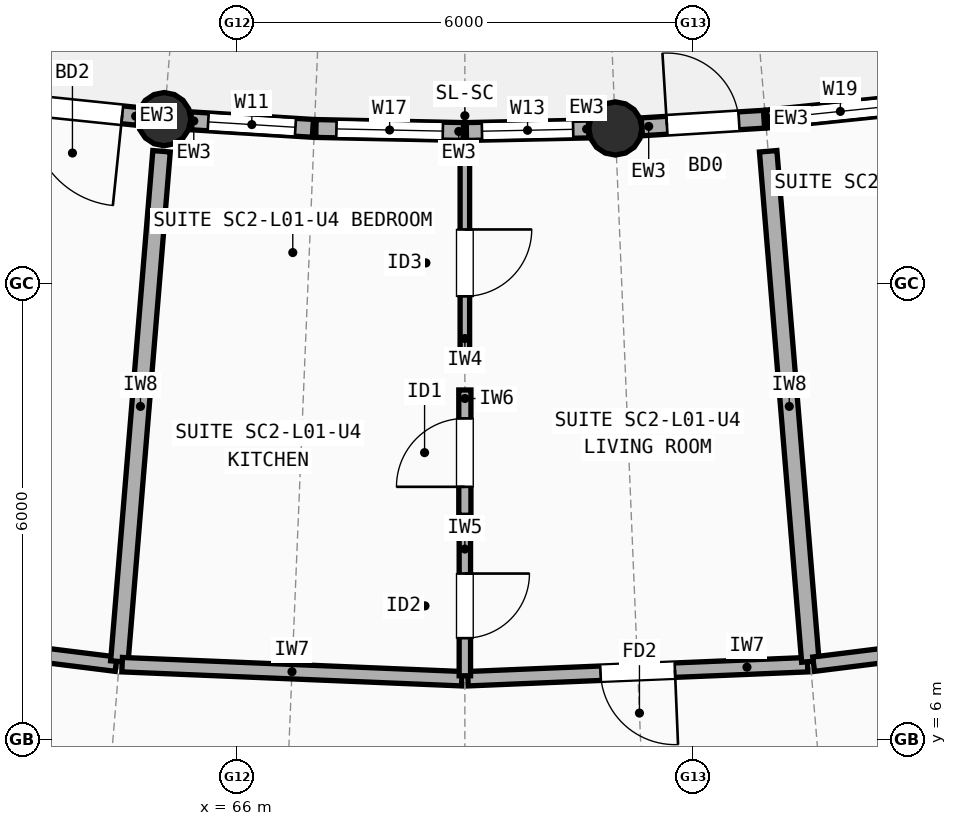
"""IFC4 building model, lengths in metres.
Left out: names, types, materials, properties, quantities, classifications, styles, units other than length and angle.
Written with IfcOpenShell. Run it as: python <this file> out.ifc"""

import sys

from ifc_helpers import new_model, si_unit, direction, frame, frame_2d, origin, origin_2d, place, context, subcontext, project, spatial, rectangle, circle, extrude, element, fill, save


model = new_model("IFC4")
c1 = context("Model", 3, precision=1e-05, world=origin(), true_north=direction((0.0, 1.0)))
c2 = subcontext(c1, "Body", "Model", "MODEL_VIEW")
j1 = project(units=[si_unit("LENGTHUNIT", "METRE"), si_unit("PLANEANGLEUNIT", "RADIAN")], contexts=[c1])
p1 = place(None, origin())
s1 = spatial("IfcSite", under=j1, at=p1, CompositionType="ELEMENT")
p2 = place(p1, origin())
s2 = spatial("IfcBuilding", under=s1, at=p2, CompositionType="ELEMENT")
p3 = place(p2, frame((0.0, 0.0, 4.5)))
s3 = spatial("IfcBuildingStorey", under=s2, at=p3, CompositionType="ELEMENT", Elevation=4.5)
for number, where, z_axis, x_axis in (
    (1, (65.044, 14.163, 0.0), (0.0, 0.0, 1.0), (1.0, 0.0, 0.0)),
    (2, (70.979, 14.041, 0.0), (0.0, 0.0, 1.0), (1.0, 0.0, 0.0)),
):
    element("IfcColumn", number, at=place(p3, frame(where, z_axis=z_axis, x_axis=x_axis)), inside=s3, PredefinedType="COLUMN", context=c2, shape_type="SweptSolid", body=[
        extrude(circle(Radius=0.35, at=origin_2d()), origin(), (0.0, 0.0, 1.0), 2.948),
    ])
p4 = place(p3, frame((63.094, 14.365, 0.0), z_axis=(0.0, 0.0, 1.0), x_axis=(0.994685905428, -0.10295605637, 0.0)))
e3 = element("IfcWall", 3, at=p4, inside=s3, PredefinedType="STANDARD", context=c2, shape_type="SweptSolid", body=[
    extrude(rectangle(XDim=1.61, YDim=0.235, at=frame_2d((0.805, 0.0))), origin(), (0.0, 0.0, 1.0), 2.684),
])
p5 = place(p4, frame((0.205, 0.0, 0.0)))
e4 = element("IfcOpeningElement", 4, at=p5, cuts=e3, PredefinedType="OPENING", context=c2, shape_type="SweptSolid", body=[
    extrude(rectangle(XDim=1.2, YDim=2.15, at=frame_2d((0.6, 1.075))), frame((0.0, 0.127, 0.0), z_axis=(0.0, -1.0, 0.0), x_axis=(1.0, 0.0, 0.0)), (0.0, 0.0, 1.0), 0.255),
])
p6 = place(p3, frame((65.394, 14.142, 0.0), z_axis=(0.0, 0.0, 1.0), x_axis=(0.998084310064, -0.061868489594, 0.0)))
e5 = element("IfcWall", 5, at=p6, inside=s3, PredefinedType="STANDARD", context=c2, shape_type="SweptSolid", body=[
    extrude(rectangle(XDim=1.61, YDim=0.235, at=frame_2d((0.805, 0.0))), origin(), (0.0, 0.0, 1.0), 2.684),
])
p7 = place(p6, frame((0.23, 0.0, 0.85)))
e6 = element("IfcOpeningElement", 6, at=p7, cuts=e5, PredefinedType="OPENING", context=c2, shape_type="SweptSolid", body=[
    extrude(rectangle(XDim=1.15, YDim=1.45, at=frame_2d((0.575, 0.725))), frame((0.0, 0.127, 0.0), z_axis=(0.0, -1.0, 0.0), x_axis=(1.0, 0.0, 0.0)), (0.0, 0.0, 1.0), 0.255),
])
p8 = place(p3, frame((67.04, 14.04, 0.0), z_axis=(0.0, 0.0, 1.0), x_axis=(0.999789612304, -0.020511731505, 0.0)))
e7 = element("IfcWall", 7, at=p8, inside=s3, PredefinedType="STANDARD", context=c2, shape_type="SweptSolid", body=[
    extrude(rectangle(XDim=1.94, YDim=0.235, at=frame_2d((0.97, 0.0))), origin(), (0.0, 0.0, 1.0), 2.684),
])
p9 = place(p8, frame((0.27, 0.0, 0.85)))
e8 = element("IfcOpeningElement", 8, at=p9, cuts=e7, PredefinedType="OPENING", context=c2, shape_type="SweptSolid", body=[
    extrude(rectangle(XDim=1.4, YDim=1.5, at=frame_2d((0.7, 0.75))), frame((0.0, 0.127, 0.0), z_axis=(0.0, -1.0, 0.0), x_axis=(1.0, 0.0, 0.0)), (0.0, 0.0, 1.0), 0.255),
])
p10 = place(p3, frame((69.02, 14.0, 0.0), z_axis=(0.0, 0.0, 1.0), x_axis=(0.999787311946, 0.020623551407, 0.0)))
e9 = element("IfcWall", 9, at=p10, inside=s3, PredefinedType="STANDARD", context=c2, shape_type="SweptSolid", body=[
    extrude(rectangle(XDim=1.61, YDim=0.235, at=frame_2d((0.805, 0.0))), origin(), (0.0, 0.0, 1.0), 2.684),
])
p11 = place(p10, frame((0.205, 0.0, 0.85)))
e10 = element("IfcOpeningElement", 10, at=p11, cuts=e9, PredefinedType="OPENING", context=c2, shape_type="SweptSolid", body=[
    extrude(rectangle(XDim=1.2, YDim=1.45, at=frame_2d((0.6, 0.725))), frame((0.0, 0.127, 0.0), z_axis=(0.0, -1.0, 0.0), x_axis=(1.0, 0.0, 0.0)), (0.0, 0.0, 1.0), 0.255),
])
p12 = place(p3, frame((71.329, 14.062, 0.0), z_axis=(0.0, 0.0, 1.0), x_axis=(0.998084310064, 0.061868489594, 0.0)))
e11 = element("IfcWall", 11, at=p12, inside=s3, PredefinedType="STANDARD", context=c2, shape_type="SweptSolid", body=[
    extrude(rectangle(XDim=1.61, YDim=0.235, at=frame_2d((0.805, 0.0))), origin(), (0.0, 0.0, 1.0), 2.684),
])
p13 = place(p12, frame((0.33, 0.0, 0.0)))
e12 = element("IfcOpeningElement", 12, at=p13, cuts=e11, PredefinedType="OPENING", context=c2, shape_type="SweptSolid", body=[
    extrude(rectangle(XDim=0.95, YDim=2.12, at=frame_2d((0.475, 1.06))), frame((0.0, 0.127, 0.0), z_axis=(0.0, -1.0, 0.0), x_axis=(1.0, 0.0, 0.0)), (0.0, 0.0, 1.0), 0.255),
])
p14 = place(p3, frame((72.976, 14.165, 0.0), z_axis=(0.0, 0.0, 1.0), x_axis=(0.994688684624, 0.10292920228, 0.0)))
e13 = element("IfcWall", 13, at=p14, inside=s3, PredefinedType="STANDARD", context=c2, shape_type="SweptSolid", body=[
    extrude(rectangle(XDim=1.94, YDim=0.235, at=frame_2d((0.97, 0.0))), origin(), (0.0, 0.0, 1.0), 2.684),
])
p15 = place(p14, frame((0.22, 0.0, 0.85)))
e14 = element("IfcOpeningElement", 14, at=p15, cuts=e13, PredefinedType="OPENING", context=c2, shape_type="SweptSolid", body=[
    extrude(rectangle(XDim=1.5, YDim=1.5, at=frame_2d((0.75, 0.75))), frame((0.0, 0.127, 0.0), z_axis=(0.0, -1.0, 0.0), x_axis=(1.0, 0.0, 0.0)), (0.0, 0.0, 1.0), 0.255),
])
p16 = place(p3, frame((59.972, 7.545, 0.0), z_axis=(0.0, 0.0, 1.0), x_axis=(0.992349920368, -0.123457019023, 0.0)))
e15 = element("IfcWall", 15, at=p16, inside=s3, PredefinedType="SOLIDWALL", context=c2, shape_type="SweptSolid", body=[
    extrude(rectangle(XDim=4.473, YDim=0.19, at=frame_2d((2.237, 0.0))), origin(), (0.0, 0.0, 1.0), 2.762),
])
p17 = place(p16, frame((1.737, 0.0, 0.0)))
e16 = element("IfcOpeningElement", 16, at=p17, cuts=e15, PredefinedType="OPENING", context=c2, shape_type="SweptSolid", body=[
    extrude(rectangle(XDim=1.0, YDim=2.15, at=frame_2d((0.5, 1.075))), frame((0.0, 0.105, 0.0), z_axis=(0.0, -1.0, 0.0), x_axis=(1.0, 0.0, 0.0)), (0.0, 0.0, 1.0), 0.21),
])
p18 = place(p3, frame((65.009, 13.741, 0.0), z_axis=(0.0, 0.0, 1.0), x_axis=(-0.082418569382, -0.996597802236, 0.0)))
e17 = element("IfcWall", 17, at=p18, inside=s3, PredefinedType="SOLIDWALL", context=c2, shape_type="SweptSolid", body=[
    extrude(rectangle(XDim=6.736, YDim=0.23, at=frame_2d((3.368, 0.0))), origin(), (0.0, 0.0, 1.0), 2.722),
])
p19 = place(p3, frame((64.491, 6.986, 0.0), z_axis=(0.0, 0.0, 1.0), x_axis=(0.999148329529, -0.041262762871, 0.0)))
e18 = element("IfcWall", 18, at=p19, inside=s3, PredefinedType="SOLIDWALL", context=c2, shape_type="SweptSolid", body=[
    extrude(rectangle(XDim=4.473, YDim=0.19, at=frame_2d((2.237, 0.0))), origin(), (0.0, 0.0, 1.0), 2.742),
])
p20 = place(p3, frame((69.04, 6.802, 0.0), z_axis=(0.0, 0.0, 1.0), x_axis=(0.999148329529, 0.041262762871, 0.0)))
e19 = element("IfcWall", 19, at=p20, inside=s3, PredefinedType="SOLIDWALL", context=c2, shape_type="SweptSolid", body=[
    extrude(rectangle(XDim=4.473, YDim=0.19, at=frame_2d((2.237, 0.0))), origin(), (0.0, 0.0, 1.0), 2.722),
])
p21 = place(p20, frame((1.747, 0.0, 0.0)))
e20 = element("IfcOpeningElement", 20, at=p21, cuts=e19, PredefinedType="OPENING", context=c2, shape_type="SweptSolid", body=[
    extrude(rectangle(XDim=0.98, YDim=2.15, at=frame_2d((0.49, 1.075))), frame((0.0, 0.105, 0.0), z_axis=(0.0, -1.0, 0.0), x_axis=(1.0, 0.0, 0.0)), (0.0, 0.0, 1.0), 0.21),
])
p22 = place(p3, frame((69.0, 13.672, 0.0), z_axis=(0.0, 0.0, 1.0), x_axis=(0.0, -1.0, 0.0)))
e21 = element("IfcWall", 21, at=p22, inside=s3, PredefinedType="PARTITIONING", context=c2, shape_type="SweptSolid", body=[
    extrude(rectangle(XDim=2.8, YDim=0.125, at=frame_2d((1.4, 0.0))), origin(), (0.0, 0.0, 1.0), 2.762),
])
p23 = place(p22, frame((0.96, 0.0, 0.0)))
e22 = element("IfcOpeningElement", 22, at=p23, cuts=e21, PredefinedType="OPENING", context=c2, shape_type="SweptSolid", body=[
    extrude(rectangle(XDim=0.88, YDim=2.1, at=frame_2d((0.44, 1.05))), frame((0.0, 0.073, 0.0), z_axis=(0.0, -1.0, 0.0), x_axis=(1.0, 0.0, 0.0)), (0.0, 0.0, 1.0), 0.145),
])
p24 = place(p3, frame((69.0, 10.6, 0.0), z_axis=(0.0, 0.0, 1.0), x_axis=(0.0, -1.0, 0.0)))
e23 = element("IfcWall", 23, at=p24, inside=s3, PredefinedType="PLUMBINGWALL", context=c2, shape_type="SweptSolid", body=[
    extrude(rectangle(XDim=1.648, YDim=0.16, at=frame_2d((0.824, 0.0))), origin(), (0.0, 0.0, 1.0), 2.762),
])
p25 = place(p24, frame((0.374, 0.0, 0.0)))
e24 = element("IfcOpeningElement", 24, at=p25, cuts=e23, PredefinedType="OPENING", context=c2, shape_type="SweptSolid", body=[
    extrude(rectangle(XDim=0.9, YDim=2.1, at=frame_2d((0.45, 1.05))), frame((0.0, 0.09, 0.0), z_axis=(0.0, -1.0, 0.0), x_axis=(1.0, 0.0, 0.0)), (0.0, 0.0, 1.0), 0.18),
])
p26 = place(p3, frame((69.0, 8.68, 0.0), z_axis=(0.0, 0.0, 1.0), x_axis=(0.0, -1.0, 0.0)))
e25 = element("IfcWall", 25, at=p26, inside=s3, PredefinedType="PARTITIONING", context=c2, shape_type="SweptSolid", body=[
    extrude(rectangle(XDim=1.84, YDim=0.15, at=frame_2d((0.92, 0.0))), origin(), (0.0, 0.0, 1.0), 2.762),
])
p27 = place(p26, frame((0.495, 0.0, 0.0)))
e26 = element("IfcOpeningElement", 26, at=p27, cuts=e25, PredefinedType="OPENING", context=c2, shape_type="SweptSolid", body=[
    extrude(rectangle(XDim=0.85, YDim=2.1, at=frame_2d((0.425, 1.05))), frame((0.0, 0.085, 0.0), z_axis=(0.0, -1.0, 0.0), x_axis=(1.0, 0.0, 0.0)), (0.0, 0.0, 1.0), 0.17),
])
p28 = place(p3, frame((72.991, 13.741, 0.0), z_axis=(0.0, 0.0, 1.0), x_axis=(0.082418569382, -0.996597802236, 0.0)))
e27 = element("IfcWall", 27, at=p28, inside=s3, PredefinedType="SOLIDWALL", context=c2, shape_type="SweptSolid", body=[
    extrude(rectangle(XDim=6.736, YDim=0.23, at=frame_2d((3.368, 0.0))), origin(), (0.0, 0.0, 1.0), 2.742),
])
p29 = place(p3, frame((73.589, 6.993, 0.0), z_axis=(0.0, 0.0, 1.0), x_axis=(0.992349088432, 0.123463705959, 0.0)))
e28 = element("IfcWall", 28, at=p29, inside=s3, PredefinedType="SOLIDWALL", context=c2, shape_type="SweptSolid", body=[
    extrude(rectangle(XDim=4.473, YDim=0.19, at=frame_2d((2.236, 0.0))), origin(), (0.0, 0.0, 1.0), 2.762),
])
p30 = place(p5, origin())
e29 = element("IfcDoor", 29, at=p30, inside=s3, OperationType="SINGLE_SWING_RIGHT", PredefinedType="DOOR", context=c2, shape_type="SweptSolid", body=[
    extrude(rectangle(XDim=1.2, YDim=2.15, at=frame_2d((0.6, 1.075))), frame((0.0, 0.025, 0.0), z_axis=(0.0, -1.0, 0.0), x_axis=(1.0, 0.0, 0.0)), (0.0, 0.0, 1.0), 0.05),
])
fill(e4, e29)
p31 = place(p7, origin())
e30 = element("IfcWindow", 30, at=p31, inside=s3, PartitioningType="SINGLE_PANEL", PredefinedType="WINDOW", context=c2, shape_type="SweptSolid", body=[
    extrude(rectangle(XDim=1.15, YDim=1.45, at=frame_2d((0.575, 0.725))), frame((0.0, 0.03, 0.0), z_axis=(0.0, -1.0, 0.0), x_axis=(1.0, 0.0, 0.0)), (0.0, 0.0, 1.0), 0.06),
])
fill(e6, e30)
p32 = place(p9, origin())
e31 = element("IfcWindow", 31, at=p32, inside=s3, PartitioningType="SINGLE_PANEL", PredefinedType="WINDOW", context=c2, shape_type="SweptSolid", body=[
    extrude(rectangle(XDim=1.4, YDim=1.5, at=frame_2d((0.7, 0.75))), frame((0.0, 0.03, 0.0), z_axis=(0.0, -1.0, 0.0), x_axis=(1.0, 0.0, 0.0)), (0.0, 0.0, 1.0), 0.06),
])
fill(e8, e31)
p33 = place(p11, origin())
e32 = element("IfcWindow", 32, at=p33, inside=s3, PartitioningType="SINGLE_PANEL", PredefinedType="WINDOW", context=c2, shape_type="SweptSolid", body=[
    extrude(rectangle(XDim=1.2, YDim=1.45, at=frame_2d((0.6, 0.725))), frame((0.0, 0.03, 0.0), z_axis=(0.0, -1.0, 0.0), x_axis=(1.0, 0.0, 0.0)), (0.0, 0.0, 1.0), 0.06),
])
fill(e10, e32)
p34 = place(p13, origin())
e33 = element("IfcDoor", 33, at=p34, inside=s3, OperationType="SINGLE_SWING_LEFT", PredefinedType="DOOR", context=c2, shape_type="SweptSolid", body=[
    extrude(rectangle(XDim=0.95, YDim=2.12, at=frame_2d((0.475, 1.06))), frame((0.0, 0.025, 0.0), z_axis=(0.0, -1.0, 0.0), x_axis=(1.0, 0.0, 0.0)), (0.0, 0.0, 1.0), 0.05),
])
fill(e12, e33)
p35 = place(p15, origin())
e34 = element("IfcWindow", 34, at=p35, inside=s3, PartitioningType="SINGLE_PANEL", PredefinedType="WINDOW", context=c2, shape_type="SweptSolid", body=[
    extrude(rectangle(XDim=1.5, YDim=1.5, at=frame_2d((0.75, 0.75))), frame((0.0, 0.03, 0.0), z_axis=(0.0, -1.0, 0.0), x_axis=(1.0, 0.0, 0.0)), (0.0, 0.0, 1.0), 0.06),
])
fill(e14, e34)
p36 = place(p21, origin())
e35 = element("IfcDoor", 35, at=p36, inside=s3, OperationType="SINGLE_SWING_RIGHT", PredefinedType="DOOR", context=c2, shape_type="SweptSolid", body=[
    extrude(rectangle(XDim=0.98, YDim=2.15, at=frame_2d((0.49, 1.075))), frame((0.0, 0.025, 0.0), z_axis=(0.0, -1.0, 0.0), x_axis=(1.0, 0.0, 0.0)), (0.0, 0.0, 1.0), 0.05),
])
fill(e20, e35)
p37 = place(p23, origin())
e36 = element("IfcDoor", 36, at=p37, inside=s3, OperationType="SINGLE_SWING_LEFT", PredefinedType="DOOR", context=c2, shape_type="SweptSolid", body=[
    extrude(rectangle(XDim=0.88, YDim=2.1, at=frame_2d((0.44, 1.05))), frame((0.0, 0.025, 0.0), z_axis=(0.0, -1.0, 0.0), x_axis=(1.0, 0.0, 0.0)), (0.0, 0.0, 1.0), 0.05),
])
fill(e22, e36)
p38 = place(p25, origin())
e37 = element("IfcDoor", 37, at=p38, inside=s3, OperationType="SINGLE_SWING_RIGHT", PredefinedType="DOOR", context=c2, shape_type="SweptSolid", body=[
    extrude(rectangle(XDim=0.9, YDim=2.1, at=frame_2d((0.45, 1.05))), frame((0.0, 0.025, 0.0), z_axis=(0.0, -1.0, 0.0), x_axis=(1.0, 0.0, 0.0)), (0.0, 0.0, 1.0), 0.05),
])
fill(e24, e37)
p39 = place(p27, origin())
e38 = element("IfcDoor", 38, at=p39, inside=s3, OperationType="SINGLE_SWING_LEFT", PredefinedType="DOOR", context=c2, shape_type="SweptSolid", body=[
    extrude(rectangle(XDim=0.85, YDim=2.1, at=frame_2d((0.425, 1.05))), frame((0.0, 0.025, 0.0), z_axis=(0.0, -1.0, 0.0), x_axis=(1.0, 0.0, 0.0)), (0.0, 0.0, 1.0), 0.05),
])
fill(e26, e38)
save(model, sys.argv[1])
